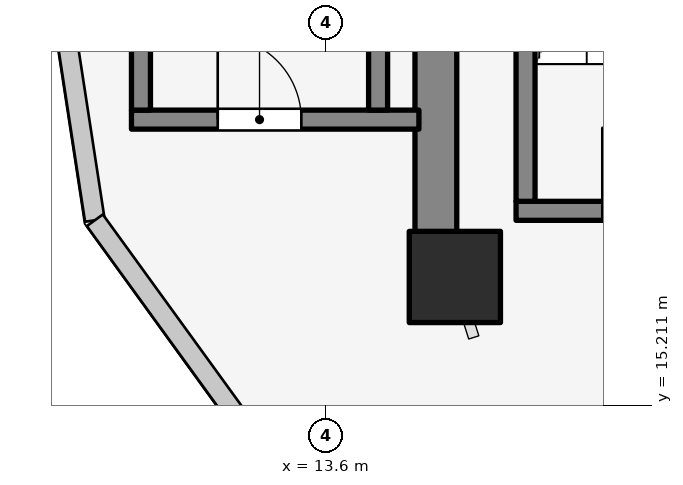
"""IFC4 building model, lengths in metres.
Left out: names, types, materials, properties, quantities, classifications, styles, units other than length and angle.
Written with IfcOpenShell. Run it as: python <this file> out.ifc"""

import sys

from ifc_helpers import new_model, si_unit, direction, frame, frame_2d, origin, origin_2d, place, context, subcontext, project, spatial, rectangle, extrude, element, fill, save


model = new_model("IFC4")
c1 = context("Model", 3, precision=1e-05, world=origin(), true_north=direction((0.0, 1.0)))
c2 = subcontext(c1, "Body", "Model", "MODEL_VIEW")
j1 = project(units=[si_unit("LENGTHUNIT", "METRE"), si_unit("PLANEANGLEUNIT", "RADIAN")], contexts=[c1])
p1 = place(None, origin())
s1 = spatial("IfcSite", under=j1, at=p1, CompositionType="ELEMENT")
p2 = place(p1, origin())
s2 = spatial("IfcBuilding", under=s1, at=p2, CompositionType="ELEMENT")
p3 = place(p2, frame((0.0, 0.0, 193.2)))
s3 = spatial("IfcBuildingStorey", under=s2, at=p3, CompositionType="ELEMENT", Elevation=193.2)
p4 = place(p3, frame((15.05, 17.05, 0.0), z_axis=(0.0, 0.0, 1.0), x_axis=(0.0, 1.0, 0.0)))
e1 = element("IfcWall", 1, at=p4, inside=s3, PredefinedType="SHEAR", context=c2, shape_type="SweptSolid", body=[
    extrude(rectangle(XDim=12.8, YDim=0.55, at=frame_2d((6.4, 0.0))), origin(), (0.0, 0.0, 1.0), 4.2),
])
p5 = place(p3, frame((16.105, 17.77, 0.0), z_axis=(0.0, 0.0, 1.0), x_axis=(1.0, 0.0, 0.0)))
e2 = element("IfcWall", 2, at=p5, inside=s3, PredefinedType="SOLIDWALL", context=c2, shape_type="SweptSolid", body=[
    extrude(rectangle(XDim=3.37, YDim=0.25, at=frame_2d((1.685, 0.0))), origin(), (0.0, 0.0, 1.0), 4.2),
])
p6 = place(p5, frame((1.135, 0.0, 0.0)))
e3 = element("IfcOpeningElement", 3, at=p6, cuts=e2, PredefinedType="OPENING", context=c2, shape_type="SweptSolid", body=[
    extrude(rectangle(XDim=1.1, YDim=2.1, at=frame_2d((0.55, 1.05))), frame((0.0, 0.135, 0.0), z_axis=(0.0, -1.0, 0.0), x_axis=(1.0, 0.0, 0.0)), (0.0, 0.0, 1.0), 0.27),
])
p7 = place(p3, frame((16.23, 17.895, 0.0), z_axis=(0.0, 0.0, 1.0), x_axis=(0.0, 1.0, 0.0)))
e4 = element("IfcWall", 4, at=p7, inside=s3, PredefinedType="SOLIDWALL", context=c2, shape_type="SweptSolid", body=[
    extrude(rectangle(XDim=7.81, YDim=0.25, at=frame_2d((3.905, 0.0))), origin(), (0.0, 0.0, 1.0), 4.2),
])
p8 = place(p3, frame((11.045, 18.97, 0.0), z_axis=(0.0, 0.0, 1.0), x_axis=(1.0, 0.0, 0.0)))
e5 = element("IfcWall", 5, at=p8, inside=s3, PredefinedType="SOLIDWALL", context=c2, shape_type="SweptSolid", body=[
    extrude(rectangle(XDim=3.782, YDim=0.25, at=frame_2d((1.891, 0.0))), origin(), (0.0, 0.0, 1.0), 4.2),
])
p9 = place(p8, frame((1.135, 0.0, 0.0)))
e6 = element("IfcOpeningElement", 6, at=p9, cuts=e5, PredefinedType="OPENING", context=c2, shape_type="SweptSolid", body=[
    extrude(rectangle(XDim=1.1, YDim=2.1, at=frame_2d((0.55, 1.05))), frame((0.0, 0.135, 0.0), z_axis=(0.0, -1.0, 0.0), x_axis=(1.0, 0.0, 0.0)), (0.0, 0.0, 1.0), 0.27),
])
for number, where, z_axis, x_axis in (
    (7, (11.17, 19.095, 0.0), (0.0, 0.0, 1.0), (0.0, 1.0, 0.0)),
    (8, (14.29, 19.095, 0.0), (0.0, 0.0, 1.0), (0.0, 1.0, 0.0)),
):
    element("IfcWall", number, at=place(p3, frame(where, z_axis=z_axis, x_axis=x_axis)), inside=s3, PredefinedType="SOLIDWALL", context=c2, shape_type="SweptSolid", body=[
        extrude(rectangle(XDim=7.81, YDim=0.25, at=frame_2d((3.905, 0.0))), origin(), (0.0, 0.0, 1.0), 4.2),
    ])
p10 = place(p3, frame((15.3, 16.9, 0.0), z_axis=(0.0, 0.0, 1.0), x_axis=(1.0, 0.0, 0.0)))
e9 = element("IfcColumn", 9, at=p10, inside=s3, PredefinedType="COLUMN", context=c2, shape_type="SweptSolid", body=[
    extrude(rectangle(XDim=1.2, YDim=1.2, at=origin_2d()), origin(), (0.0, 0.0, 1.0), 4.2),
])
p11 = place(p3, frame((9.74, 23.0, 0.0), z_axis=(0.0, 0.0, 1.0), x_axis=(0.151931872057, -0.988390968318, 0.0)))
e10 = element("IfcWall", 10, at=p11, inside=s3, PredefinedType="STANDARD", context=c2, shape_type="SweptSolid", body=[
    extrude(rectangle(XDim=5.417, YDim=0.26, at=frame_2d((2.708, 0.0))), origin(), (0.0, 0.0, 1.0), 2.32),
])
p12 = place(p3, frame((10.563, 17.646, 0.0), z_axis=(0.0, 0.0, 1.0), x_axis=(0.587019267557, -0.809572961207, 0.0)))
e11 = element("IfcWall", 11, at=p12, inside=s3, PredefinedType="STANDARD", context=c2, shape_type="SweptSolid", body=[
    extrude(rectangle(XDim=4.411, YDim=0.26, at=frame_2d((2.206, 0.0))), origin(), (0.0, 0.0, 1.0), 2.32),
])
p13 = place(p6, origin())
e12 = element("IfcDoor", 12, at=p13, inside=s3, OperationType="SINGLE_SWING_LEFT", PredefinedType="DOOR", context=c2, shape_type="SweptSolid", body=[
    extrude(rectangle(XDim=1.1, YDim=2.1, at=frame_2d((0.55, 1.05))), frame((0.0, 0.025, 0.0), z_axis=(0.0, -1.0, 0.0), x_axis=(1.0, 0.0, 0.0)), (0.0, 0.0, 1.0), 0.05),
])
fill(e3, e12)
p14 = place(p9, origin())
e13 = element("IfcDoor", 13, at=p14, inside=s3, OperationType="SINGLE_SWING_LEFT", PredefinedType="DOOR", context=c2, shape_type="SweptSolid", body=[
    extrude(rectangle(XDim=1.1, YDim=2.1, at=frame_2d((0.55, 1.05))), frame((0.0, 0.025, 0.0), z_axis=(0.0, -1.0, 0.0), x_axis=(1.0, 0.0, 0.0)), (0.0, 0.0, 1.0), 0.05),
])
fill(e6, e13)
save(model, sys.argv[1])
